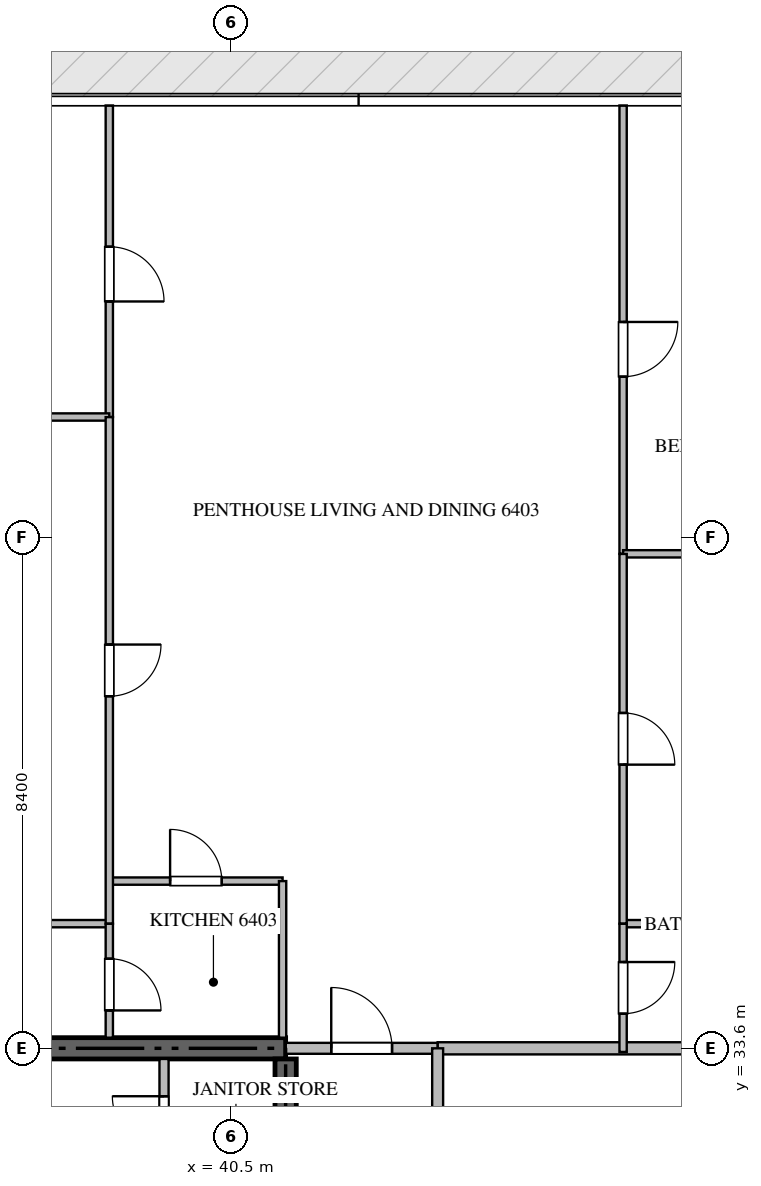
"""IFC4 building model, lengths in metres.
Left out: names, types, materials, properties, quantities, classifications, styles, units other than length and angle.
Written with IfcOpenShell. Run it as: python <this file> out.ifc"""

import sys

from ifc_helpers import new_model, si_unit, direction, frame, frame_2d, origin, place, context, subcontext, project, spatial, rectangle, extrude, source, transform, mapped, element, fill, save


model = new_model("IFC4")
c1 = context("Model", 3, precision=1e-05, world=origin(), true_north=direction((0.0, 1.0)))
c2 = subcontext(c1, "Body", "Model", "MODEL_VIEW")
j1 = project(units=[si_unit("LENGTHUNIT", "METRE"), si_unit("PLANEANGLEUNIT", "RADIAN")], contexts=[c1])
p1 = place(None, origin())
s1 = spatial("IfcSite", under=j1, at=p1, CompositionType="ELEMENT")
p2 = place(p1, origin())
s2 = spatial("IfcBuilding", under=s1, at=p2, CompositionType="ELEMENT")
p3 = place(p2, frame((0.0, 0.0, 256.65)))
s3 = spatial("IfcBuildingStorey", under=s2, at=p3, CompositionType="ELEMENT", Elevation=256.65)
p4 = place(p3, frame((41.4, 33.6, -0.26), z_axis=(0.0, 0.0, 1.0), x_axis=(-1.0, 0.0, 0.0)))
e1 = element("IfcWall", 1, at=p4, inside=s3, PredefinedType="SHEAR", context=c2, shape_type="SweptSolid", body=[
    extrude(rectangle(XDim=18.0, YDim=0.35, at=frame_2d((9.0, 0.0))), origin(), (0.0, 0.0, 1.0), 3.848),
])
p5 = place(p3, frame((41.4, 27.75, -0.26), z_axis=(0.0, 0.0, 1.0), x_axis=(0.0, 1.0, 0.0)))
e2 = element("IfcWall", 2, at=p5, inside=s3, PredefinedType="SHEAR", context=c2, shape_type="SweptSolid", body=[
    extrude(rectangle(XDim=5.675, YDim=0.35, at=frame_2d((2.837, 0.0))), origin(), (0.0, 0.0, 1.0), 3.848),
])
p6 = place(p3, frame((39.4, 31.35, 0.0), z_axis=(0.0, 0.0, 1.0), x_axis=(0.0, 1.0, 0.0)))
e3 = element("IfcWall", 3, at=p6, inside=s3, PredefinedType="PARTITIONING", context=c2, shape_type="SweptSolid", body=[
    extrude(rectangle(XDim=2.075, YDim=0.15, at=frame_2d((1.038, 0.0))), origin(), (0.0, 0.0, 1.0), 3.59),
])
p7 = place(p6, frame((0.612, 0.0, 0.0)))
e4 = element("IfcOpeningElement", 4, at=p7, cuts=e3, PredefinedType="OPENING", context=c2, shape_type="SweptSolid", body=[
    extrude(rectangle(XDim=0.85, YDim=2.1, at=frame_2d((0.425, 1.05))), frame((0.0, 0.085, 0.0), z_axis=(0.0, -1.0, 0.0), x_axis=(1.0, 0.0, 0.0)), (0.0, 0.0, 1.0), 0.17),
])
p8 = place(p3, frame((43.9, 33.6, 0.0), z_axis=(0.0, 0.0, 1.0), x_axis=(1.0, 0.0, 0.0)))
e5 = element("IfcWall", 5, at=p8, inside=s3, PredefinedType="PARTITIONING", context=c2, shape_type="SweptSolid", body=[
    extrude(rectangle(XDim=13.418, YDim=0.2, at=frame_2d((6.709, 0.0))), origin(), (0.0, 0.0, 1.0), 3.59),
])
p9 = place(p3, frame((41.402, 33.6, 0.0), z_axis=(0.0, 0.0, 1.0), x_axis=(1.0, 0.0, 0.0)))
e6 = element("IfcWall", 6, at=p9, inside=s3, PredefinedType="PARTITIONING", context=c2, shape_type="SweptSolid", body=[
    extrude(rectangle(XDim=2.496, YDim=0.18, at=frame_2d((1.248, 0.0))), origin(), (0.0, 0.0, 1.0), 3.59),
])
p10 = place(p9, frame((0.748, 0.0, 0.0)))
e7 = element("IfcOpeningElement", 7, at=p10, cuts=e6, PredefinedType="OPENING", context=c2, shape_type="SweptSolid", body=[
    extrude(rectangle(XDim=1.0, YDim=2.15, at=frame_2d((0.5, 1.075))), frame((0.0, 0.1, 0.0), z_axis=(0.0, -1.0, 0.0), x_axis=(1.0, 0.0, 0.0)), (0.0, 0.0, 1.0), 0.2),
])
p11 = place(p3, frame((43.9, 16.8, 0.0), z_axis=(0.0, 0.0, 1.0), x_axis=(0.0, 1.0, 0.0)))
e8 = element("IfcWall", 8, at=p11, inside=s3, PredefinedType="PARTITIONING", context=c2, shape_type="SweptSolid", body=[
    extrude(rectangle(XDim=16.8, YDim=0.18, at=frame_2d((8.4, 0.0))), origin(), (0.0, 0.0, 1.0), 3.59),
])
p12 = place(p11, frame((3.018, 0.0, 0.0)))
e9 = element("IfcOpeningElement", 9, at=p12, cuts=e8, PredefinedType="OPENING", context=c2, shape_type="SweptSolid", body=[
    extrude(rectangle(XDim=1.0, YDim=2.15, at=frame_2d((0.5, 1.075))), frame((0.0, 0.1, 0.0), z_axis=(0.0, -1.0, 0.0), x_axis=(1.0, 0.0, 0.0)), (0.0, 0.0, 1.0), 0.2),
])
p13 = place(p11, frame((9.18, 0.0, 0.0)))
e10 = element("IfcOpeningElement", 10, at=p13, cuts=e8, PredefinedType="OPENING", context=c2, shape_type="SweptSolid", body=[
    extrude(rectangle(XDim=1.0, YDim=2.15, at=frame_2d((0.5, 1.075))), frame((0.0, 0.1, 0.0), z_axis=(0.0, -1.0, 0.0), x_axis=(1.0, 0.0, 0.0)), (0.0, 0.0, 1.0), 0.2),
])
p14 = place(p11, frame((14.5, 0.0, 0.0)))
e11 = element("IfcOpeningElement", 11, at=p14, cuts=e8, PredefinedType="OPENING", context=c2, shape_type="SweptSolid", body=[
    extrude(rectangle(XDim=1.0, YDim=2.15, at=frame_2d((0.5, 1.075))), frame((0.0, 0.1, 0.0), z_axis=(0.0, -1.0, 0.0), x_axis=(1.0, 0.0, 0.0)), (0.0, 0.0, 1.0), 0.2),
])
p15 = place(p3, frame((38.5, 36.35, 0.0), z_axis=(0.0, 0.0, 1.0), x_axis=(1.0, 0.0, 0.0)))
e12 = element("IfcWall", 12, at=p15, inside=s3, PredefinedType="PARTITIONING", context=c2, shape_type="SweptSolid", body=[
    extrude(rectangle(XDim=2.85, YDim=0.12, at=frame_2d((1.425, 0.0))), origin(), (0.0, 0.0, 1.0), 3.59),
])
p16 = place(p15, frame((1.0, 0.0, 0.0)))
e13 = element("IfcOpeningElement", 13, at=p16, cuts=e12, PredefinedType="OPENING", context=c2, shape_type="SweptSolid", body=[
    extrude(rectangle(XDim=0.85, YDim=2.1, at=frame_2d((0.425, 1.05))), frame((0.0, 0.07, 0.0), z_axis=(0.0, -1.0, 0.0), x_axis=(1.0, 0.0, 0.0)), (0.0, 0.0, 1.0), 0.14),
])
p17 = place(p3, frame((41.35, 36.35, 0.0), z_axis=(0.0, 0.0, 1.0), x_axis=(0.0, -1.0, 0.0)))
e14 = element("IfcWall", 14, at=p17, inside=s3, PredefinedType="PARTITIONING", context=c2, shape_type="SweptSolid", body=[
    extrude(rectangle(XDim=2.575, YDim=0.12, at=frame_2d((1.288, 0.0))), origin(), (0.0, 0.0, 1.0), 3.59),
])
p18 = place(p3, frame((38.5, 49.105, 0.0), z_axis=(0.0, 0.0, 1.0), x_axis=(0.0, -1.0, 0.0)))
e15 = element("IfcWall", 15, at=p18, inside=s3, PredefinedType="PARTITIONING", context=c2, shape_type="SweptSolid", body=[
    extrude(rectangle(XDim=5.123, YDim=0.12, at=frame_2d((2.562, 0.0))), origin(), (0.0, 0.0, 1.0), 3.59),
])
p19 = place(p18, frame((2.323, 0.0, 0.0)))
e16 = element("IfcOpeningElement", 16, at=p19, cuts=e15, PredefinedType="OPENING", context=c2, shape_type="SweptSolid", body=[
    extrude(rectangle(XDim=0.9, YDim=2.1, at=frame_2d((0.45, 1.05))), frame((0.0, 0.07, 0.0), z_axis=(0.0, -1.0, 0.0), x_axis=(1.0, 0.0, 0.0)), (0.0, 0.0, 1.0), 0.14),
])
for number, where, z_axis, x_axis in (
    (17, (30.14, 43.982, 0.0), (0.0, 0.0, 1.0), (1.0, 0.0, 0.0)),
    (18, (30.14, 35.65, 0.0), (0.0, 0.0, 1.0), (1.0, 0.0, 0.0)),
):
    element("IfcWall", number, at=place(p3, frame(where, z_axis=z_axis, x_axis=x_axis)), inside=s3, PredefinedType="PARTITIONING", context=c2, shape_type="SweptSolid", body=[
        extrude(rectangle(XDim=8.36, YDim=0.12, at=frame_2d((4.18, 0.0))), origin(), (0.0, 0.0, 1.0), 3.59),
    ])
p20 = place(p3, frame((38.5, 43.98, 0.0), z_axis=(0.0, 0.0, 1.0), x_axis=(0.0, -1.0, 0.0)))
e19 = element("IfcWall", 19, at=p20, inside=s3, PredefinedType="PARTITIONING", context=c2, shape_type="SweptSolid", body=[
    extrude(rectangle(XDim=8.33, YDim=0.12, at=frame_2d((4.165, 0.0))), origin(), (0.0, 0.0, 1.0), 3.59),
])
p21 = place(p20, frame((3.74, 0.0, 0.0)))
e20 = element("IfcOpeningElement", 20, at=p21, cuts=e19, PredefinedType="OPENING", context=c2, shape_type="SweptSolid", body=[
    extrude(rectangle(XDim=0.85, YDim=2.1, at=frame_2d((0.425, 1.05))), frame((0.0, 0.07, 0.0), z_axis=(0.0, -1.0, 0.0), x_axis=(1.0, 0.0, 0.0)), (0.0, 0.0, 1.0), 0.14),
])
p22 = place(p3, frame((38.5, 35.648, 0.0), z_axis=(0.0, 0.0, 1.0), x_axis=(0.0, -1.0, 0.0)))
e21 = element("IfcWall", 21, at=p22, inside=s3, PredefinedType="PARTITIONING", context=c2, shape_type="SweptSolid", body=[
    extrude(rectangle(XDim=1.873, YDim=0.12, at=frame_2d((0.937, 0.0))), origin(), (0.0, 0.0, 1.0), 3.59),
])
p23 = place(p22, frame((0.575, 0.0, 0.0)))
e22 = element("IfcOpeningElement", 22, at=p23, cuts=e21, PredefinedType="OPENING", context=c2, shape_type="SweptSolid", body=[
    extrude(rectangle(XDim=0.85, YDim=2.1, at=frame_2d((0.425, 1.05))), frame((0.0, 0.07, 0.0), z_axis=(0.0, -1.0, 0.0), x_axis=(1.0, 0.0, 0.0)), (0.0, 0.0, 1.0), 0.14),
])
p24 = place(p3, frame((46.95, 49.105, 0.0), z_axis=(0.0, 0.0, 1.0), x_axis=(0.0, -1.0, 0.0)))
e23 = element("IfcWall", 23, at=p24, inside=s3, PredefinedType="PARTITIONING", context=c2, shape_type="SweptSolid", body=[
    extrude(rectangle(XDim=7.373, YDim=0.12, at=frame_2d((3.687, 0.0))), origin(), (0.0, 0.0, 1.0), 3.59),
])
p25 = place(p24, frame((3.56, 0.0, 0.0)))
e24 = element("IfcOpeningElement", 24, at=p25, cuts=e23, PredefinedType="OPENING", context=c2, shape_type="SweptSolid", body=[
    extrude(rectangle(XDim=0.9, YDim=2.1, at=frame_2d((0.45, 1.05))), frame((0.0, 0.07, 0.0), z_axis=(0.0, -1.0, 0.0), x_axis=(1.0, 0.0, 0.0)), (0.0, 0.0, 1.0), 0.14),
])
p26 = place(p3, frame((46.95, 41.732, 0.0), z_axis=(0.0, 0.0, 1.0), x_axis=(1.0, 0.0, 0.0)))
e25 = element("IfcWall", 25, at=p26, inside=s3, PredefinedType="PARTITIONING", context=c2, shape_type="SweptSolid", body=[
    extrude(rectangle(XDim=6.355, YDim=0.12, at=frame_2d((3.177, 0.0))), origin(), (0.0, 0.0, 1.0), 3.59),
])
p27 = place(p3, frame((46.95, 35.65, 0.0), z_axis=(0.0, 0.0, 1.0), x_axis=(1.0, 0.0, 0.0)))
e26 = element("IfcWall", 26, at=p27, inside=s3, PredefinedType="PARTITIONING", context=c2, shape_type="SweptSolid", body=[
    extrude(rectangle(XDim=3.2, YDim=0.12, at=frame_2d((1.6, 0.0))), origin(), (0.0, 0.0, 1.0), 3.59),
])
p28 = place(p3, frame((46.95, 41.73, 0.0), z_axis=(0.0, 0.0, 1.0), x_axis=(0.0, -1.0, 0.0)))
e27 = element("IfcWall", 27, at=p28, inside=s3, PredefinedType="PARTITIONING", context=c2, shape_type="SweptSolid", body=[
    extrude(rectangle(XDim=6.08, YDim=0.12, at=frame_2d((3.04, 0.0))), origin(), (0.0, 0.0, 1.0), 3.59),
])
p29 = place(p28, frame((2.615, 0.0, 0.0)))
e28 = element("IfcOpeningElement", 28, at=p29, cuts=e27, PredefinedType="OPENING", context=c2, shape_type="SweptSolid", body=[
    extrude(rectangle(XDim=0.85, YDim=2.1, at=frame_2d((0.425, 1.05))), frame((0.0, 0.07, 0.0), z_axis=(0.0, -1.0, 0.0), x_axis=(1.0, 0.0, 0.0)), (0.0, 0.0, 1.0), 0.14),
])
p30 = place(p3, frame((46.95, 35.648, 0.0), z_axis=(0.0, 0.0, 1.0), x_axis=(0.0, -1.0, 0.0)))
e29 = element("IfcWall", 29, at=p30, inside=s3, PredefinedType="PARTITIONING", context=c2, shape_type="SweptSolid", body=[
    extrude(rectangle(XDim=2.108, YDim=0.12, at=frame_2d((1.054, 0.0))), origin(), (0.0, 0.0, 1.0), 3.59),
])
p31 = place(p30, frame((0.629, 0.0, 0.0)))
e30 = element("IfcOpeningElement", 30, at=p31, cuts=e29, PredefinedType="OPENING", context=c2, shape_type="SweptSolid", body=[
    extrude(rectangle(XDim=0.85, YDim=2.1, at=frame_2d((0.425, 1.05))), frame((0.0, 0.07, 0.0), z_axis=(0.0, -1.0, 0.0), x_axis=(1.0, 0.0, 0.0)), (0.0, 0.0, 1.0), 0.14),
])
m1 = source(origin(), c2, "Body", "SweptSolid", [
    extrude(rectangle(XDim=0.85, YDim=2.1, at=frame_2d((0.425, 1.05))), frame((0.0, 0.025, 0.0), z_axis=(0.0, -1.0, 0.0), x_axis=(1.0, 0.0, 0.0)), (0.0, 0.0, 1.0), 0.05),
])
p32 = place(p7, origin())
e31 = element("IfcDoor", 31, at=p32, inside=s3, OperationType="SINGLE_SWING_RIGHT", PredefinedType="DOOR", context=c2, shape_type="MappedRepresentation", body=[
    mapped(m1, transform((0.0, 0.0, 0.0), scale=1.0)),
])
fill(e4, e31)
m2 = source(origin(), c2, "Body", "SweptSolid", [
    extrude(rectangle(XDim=1.0, YDim=2.15, at=frame_2d((0.5, 1.075))), frame((0.0, 0.025, 0.0), z_axis=(0.0, -1.0, 0.0), x_axis=(1.0, 0.0, 0.0)), (0.0, 0.0, 1.0), 0.05),
])
p33 = place(p10, origin())
e32 = element("IfcDoor", 32, at=p33, inside=s3, OperationType="SINGLE_SWING_LEFT", PredefinedType="DOOR", context=c2, shape_type="MappedRepresentation", body=[
    mapped(m2, transform((0.0, 0.0, 0.0), scale=1.0)),
])
fill(e7, e32)
p34 = place(p16, origin())
e33 = element("IfcDoor", 33, at=p34, inside=s3, OperationType="SINGLE_SWING_LEFT", PredefinedType="DOOR", context=c2, shape_type="MappedRepresentation", body=[
    mapped(m1, transform((0.0, 0.0, 0.0), scale=1.0)),
])
fill(e13, e33)
m3 = source(origin(), c2, "Body", "SweptSolid", [
    extrude(rectangle(XDim=0.9, YDim=2.1, at=frame_2d((0.45, 1.05))), frame((0.0, 0.025, 0.0), z_axis=(0.0, -1.0, 0.0), x_axis=(1.0, 0.0, 0.0)), (0.0, 0.0, 1.0), 0.05),
])
p35 = place(p19, origin())
e34 = element("IfcDoor", 34, at=p35, inside=s3, OperationType="SINGLE_SWING_RIGHT", PredefinedType="DOOR", context=c2, shape_type="MappedRepresentation", body=[
    mapped(m3, transform((0.0, 0.0, 0.0), scale=1.0)),
])
fill(e16, e34)
p36 = place(p21, origin())
e35 = element("IfcDoor", 35, at=p36, inside=s3, OperationType="SINGLE_SWING_LEFT", PredefinedType="DOOR", context=c2, shape_type="MappedRepresentation", body=[
    mapped(m1, transform((0.0, 0.0, 0.0), scale=1.0)),
])
fill(e20, e35)
p37 = place(p23, origin())
e36 = element("IfcDoor", 36, at=p37, inside=s3, OperationType="SINGLE_SWING_RIGHT", PredefinedType="DOOR", context=c2, shape_type="MappedRepresentation", body=[
    mapped(m1, transform((0.0, 0.0, 0.0), scale=1.0)),
])
fill(e22, e36)
p38 = place(p25, origin())
e37 = element("IfcDoor", 37, at=p38, inside=s3, OperationType="SINGLE_SWING_LEFT", PredefinedType="DOOR", context=c2, shape_type="MappedRepresentation", body=[
    mapped(m3, transform((0.0, 0.0, 0.0), scale=1.0)),
])
fill(e24, e37)
p39 = place(p29, origin())
e38 = element("IfcDoor", 38, at=p39, inside=s3, OperationType="SINGLE_SWING_RIGHT", PredefinedType="DOOR", context=c2, shape_type="MappedRepresentation", body=[
    mapped(m1, transform((0.0, 0.0, 0.0), scale=1.0)),
])
fill(e28, e38)
p40 = place(p31, origin())
e39 = element("IfcDoor", 39, at=p40, inside=s3, OperationType="SINGLE_SWING_LEFT", PredefinedType="DOOR", context=c2, shape_type="MappedRepresentation", body=[
    mapped(m1, transform((0.0, 0.0, 0.0), scale=1.0)),
])
fill(e30, e39)
save(model, sys.argv[1])
